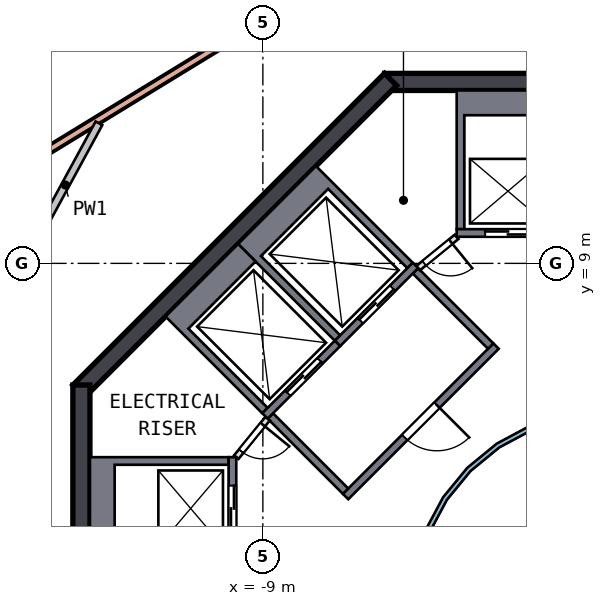
"""IFC4 building model, lengths in metres.
Left out: names, types, materials, properties, quantities, classifications, styles, units other than length and angle.
Written with IfcOpenShell. Run it as: python <this file> out.ifc"""

import sys

from ifc_helpers import new_model, si_unit, direction, frame, frame_2d, origin, place, context, subcontext, project, spatial, polyline, rectangle, outline, extrude, element, fill, save


model = new_model("IFC4")
c1 = context("Model", 3, precision=1e-05, world=origin(), true_north=direction((0.0, 1.0)))
c2 = subcontext(c1, "Body", "Model", "MODEL_VIEW")
j1 = project(units=[si_unit("LENGTHUNIT", "METRE"), si_unit("PLANEANGLEUNIT", "RADIAN")], contexts=[c1])
p1 = place(None, origin())
s1 = spatial("IfcSite", under=j1, at=p1, CompositionType="ELEMENT")
p2 = place(p1, origin())
s2 = spatial("IfcBuilding", under=s1, at=p2, CompositionType="ELEMENT")
p3 = place(p2, frame((0.0, 0.0, 284.5)))
s3 = spatial("IfcBuildingStorey", under=s2, at=p3, CompositionType="ELEMENT", Elevation=284.5)
p4 = place(p3, frame((5.799, 13.775, 0.0), z_axis=(0.0, 0.0, 1.0), x_axis=(-1.0, 0.0, 0.0)))
e1 = element("IfcWall", 1, at=p4, inside=s3, PredefinedType="SHEAR", context=c2, shape_type="SweptSolid", body=[
    extrude(rectangle(XDim=11.598, YDim=0.45, at=frame_2d((5.799, 0.0))), origin(), (0.0, 0.0, 1.0), 3.5),
])
p5 = place(p4, frame((4.899, 0.0, 0.0)))
e2 = element("IfcOpeningElement", 2, at=p5, cuts=e1, PredefinedType="OPENING", context=c2, shape_type="SweptSolid", body=[
    extrude(rectangle(XDim=1.8, YDim=2.1, at=frame_2d((0.9, 1.05))), frame((0.0, 0.235, 0.0), z_axis=(0.0, -1.0, 0.0), x_axis=(1.0, 0.0, 0.0)), (0.0, 0.0, 1.0), 0.47),
])
p6 = place(p3, frame((-5.64, 13.841, 0.0), z_axis=(0.0, 0.0, 1.0), x_axis=(-0.707106781, -0.707106781, 0.0)))
e3 = element("IfcWall", 3, at=p6, inside=s3, PredefinedType="SHEAR", context=c2, shape_type="SweptSolid", body=[
    extrude(rectangle(XDim=11.598, YDim=0.45, at=frame_2d((5.799, 0.0))), origin(), (0.0, 0.0, 1.0), 3.5),
])
p7 = place(p3, frame((-13.775, 5.799, 0.0), z_axis=(0.0, 0.0, 1.0), x_axis=(0.0, -1.0, 0.0)))
e4 = element("IfcWall", 4, at=p7, inside=s3, PredefinedType="SHEAR", context=c2, shape_type="SweptSolid", body=[
    extrude(rectangle(XDim=11.598, YDim=0.45, at=frame_2d((5.799, 0.0))), origin(), (0.0, 0.0, 1.0), 3.5),
])
p8 = place(p7, frame((4.899, 0.0, 0.0)))
e5 = element("IfcOpeningElement", 5, at=p8, cuts=e4, PredefinedType="OPENING", context=c2, shape_type="SweptSolid", body=[
    extrude(rectangle(XDim=1.8, YDim=2.1, at=frame_2d((0.9, 1.05))), frame((0.0, 0.235, 0.0), z_axis=(0.0, -1.0, 0.0), x_axis=(1.0, 0.0, 0.0)), (0.0, 0.0, 1.0), 0.47),
])
p9 = place(p3, frame((-14.861, 11.846, 0.0), z_axis=(0.0, 0.0, 1.0), x_axis=(0.853179687, 0.521617121, 0.0)))
e6 = element("IfcWall", 6, at=p9, inside=s3, PredefinedType="SOLIDWALL", context=c2, shape_type="SweptSolid", body=[
    extrude(rectangle(XDim=13.0, YDim=0.2, at=frame_2d((6.5, 0.0))), origin(), (0.0, 0.0, 1.0), 3.19),
])
p10 = place(p9, frame((5.6, 0.0, 0.0)))
e7 = element("IfcOpeningElement", 7, at=p10, cuts=e6, PredefinedType="OPENING", context=c2, shape_type="SweptSolid", body=[
    extrude(rectangle(XDim=1.8, YDim=2.4, at=frame_2d((0.9, 1.2))), frame((0.0, 0.11, 0.0), z_axis=(0.0, -1.0, 0.0), x_axis=(1.0, 0.0, 0.0)), (0.0, 0.0, 1.0), 0.22),
])
p11 = place(p3, origin())
e8 = element("IfcWall", 8, at=p11, inside=s3, PredefinedType="SOLIDWALL", context=c2, shape_type="SweptSolid", body=[
    extrude(outline(polyline([(-3.9, 13.55), (-1.2, 13.55), (-1.2, 9.9), (-1.4, 9.9), (-1.4, 12.9), (-3.7, 12.9), (-3.7, 9.9), (-3.9, 9.9), (-3.9, 13.55)])), origin(), (0.0, 0.0, 1.0), 3.19),
])
p12 = place(p3, frame((-1.2, 9.8, 0.0), z_axis=(0.0, 0.0, 1.0), x_axis=(-1.0, 0.0, 0.0)))
e9 = element("IfcWall", 9, at=p12, inside=s3, PredefinedType="SOLIDWALL", context=c2, shape_type="SweptSolid", body=[
    extrude(rectangle(XDim=2.7, YDim=0.2, at=frame_2d((1.35, 0.0))), origin(), (0.0, 0.0, 1.0), 3.19),
])
p13 = place(p12, frame((0.75, 0.0, 0.0)))
e10 = element("IfcOpeningElement", 10, at=p13, cuts=e9, PredefinedType="OPENING", context=c2, shape_type="SweptSolid", body=[
    extrude(rectangle(XDim=1.2, YDim=2.1, at=frame_2d((0.6, 1.05))), frame((0.0, 0.11, 0.0), z_axis=(0.0, -1.0, 0.0), x_axis=(1.0, 0.0, 0.0)), (0.0, 0.0, 1.0), 0.22),
])
p14 = place(p3, origin())
e11 = element("IfcWall", 11, at=p14, inside=s3, PredefinedType="SOLIDWALL", context=c2, shape_type="SweptSolid", body=[
    extrude(outline(polyline([(-13.55, 3.9), (-9.9, 3.9), (-9.9, 3.7), (-12.9, 3.7), (-12.9, 1.4), (-9.9, 1.4), (-9.9, 1.2), (-13.55, 1.2), (-13.55, 3.9)])), origin(), (0.0, 0.0, 1.0), 3.19),
])
p15 = place(p3, frame((-9.8, 1.2, 0.0), z_axis=(0.0, 0.0, 1.0), x_axis=(0.0, 1.0, 0.0)))
e12 = element("IfcWall", 12, at=p15, inside=s3, PredefinedType="SOLIDWALL", context=c2, shape_type="SweptSolid", body=[
    extrude(rectangle(XDim=2.7, YDim=0.2, at=frame_2d((1.35, 0.0))), origin(), (0.0, 0.0, 1.0), 3.19),
])
p16 = place(p15, frame((0.75, 0.0, 0.0)))
e13 = element("IfcOpeningElement", 13, at=p16, cuts=e12, PredefinedType="OPENING", context=c2, shape_type="SweptSolid", body=[
    extrude(rectangle(XDim=1.2, YDim=2.1, at=frame_2d((0.6, 1.05))), frame((0.0, 0.11, 0.0), z_axis=(0.0, -1.0, 0.0), x_axis=(1.0, 0.0, 0.0)), (0.0, 0.0, 1.0), 0.22),
])
p17 = place(p3, origin())
e14 = element("IfcWall", 14, at=p17, inside=s3, PredefinedType="SOLIDWALL", context=c2, shape_type="SweptSolid", body=[
    extrude(outline(polyline([(-9.652, 9.51), (-7.601, 11.561), (-5.056, 9.016), (-5.197, 8.874), (-7.283, 10.96), (-9.051, 9.192), (-6.965, 7.106), (-7.106, 6.965), (-9.652, 9.51)])), origin(), (0.0, 0.0, 1.0), 3.19),
])
p18 = place(p3, frame((-4.985, 8.945, 0.0), z_axis=(0.0, 0.0, 1.0), x_axis=(-0.707106781, -0.707106781, 0.0)))
e15 = element("IfcWall", 15, at=p18, inside=s3, PredefinedType="SOLIDWALL", context=c2, shape_type="SweptSolid", body=[
    extrude(rectangle(XDim=2.9, YDim=0.2, at=frame_2d((1.45, 0.0))), origin(), (0.0, 0.0, 1.0), 3.19),
])
p19 = place(p18, frame((0.85, 0.0, 0.0)))
e16 = element("IfcOpeningElement", 16, at=p19, cuts=e15, PredefinedType="OPENING", context=c2, shape_type="SweptSolid", body=[
    extrude(rectangle(XDim=1.2, YDim=2.1, at=frame_2d((0.6, 1.05))), frame((0.0, 0.11, 0.0), z_axis=(0.0, -1.0, 0.0), x_axis=(1.0, 0.0, 0.0)), (0.0, 0.0, 1.0), 0.22),
])
p20 = place(p3, origin())
e17 = element("IfcWall", 17, at=p20, inside=s3, PredefinedType="SOLIDWALL", context=c2, shape_type="SweptSolid", body=[
    extrude(outline(polyline([(-11.561, 7.601), (-9.652, 9.51), (-9.192, 9.051), (-10.96, 7.283), (-8.874, 5.197), (-9.016, 5.056), (-11.561, 7.601)])), origin(), (0.0, 0.0, 1.0), 3.19),
])
p21 = place(p3, frame((-7.036, 6.894, 0.0), z_axis=(0.0, 0.0, 1.0), x_axis=(-0.707106781, -0.707106781, 0.0)))
e18 = element("IfcWall", 18, at=p21, inside=s3, PredefinedType="SOLIDWALL", context=c2, shape_type="SweptSolid", body=[
    extrude(rectangle(XDim=2.7, YDim=0.2, at=frame_2d((1.35, 0.0))), origin(), (0.0, 0.0, 1.0), 3.19),
])
p22 = place(p21, frame((0.65, 0.0, 0.0)))
e19 = element("IfcOpeningElement", 19, at=p22, cuts=e18, PredefinedType="OPENING", context=c2, shape_type="SweptSolid", body=[
    extrude(rectangle(XDim=1.2, YDim=2.1, at=frame_2d((0.6, 1.05))), frame((0.0, 0.11, 0.0), z_axis=(0.0, -1.0, 0.0), x_axis=(1.0, 0.0, 0.0)), (0.0, 0.0, 1.0), 0.22),
])
p23 = place(p3, frame((-2.864, 6.823, 0.0), z_axis=(0.0, 0.0, 1.0), x_axis=(-0.707106781, -0.707106781, 0.0)))
e20 = element("IfcWall", 20, at=p23, inside=s3, PredefinedType="SOLIDWALL", context=c2, shape_type="SweptSolid", body=[
    extrude(rectangle(XDim=5.6, YDim=0.2, at=frame_2d((2.8, 0.0))), origin(), (0.0, 0.0, 1.0), 3.19),
])
p24 = place(p23, frame((2.2, 0.0, 0.0)))
e21 = element("IfcOpeningElement", 21, at=p24, cuts=e20, PredefinedType="OPENING", context=c2, shape_type="SweptSolid", body=[
    extrude(rectangle(XDim=1.2, YDim=2.1, at=frame_2d((0.6, 1.05))), frame((0.0, 0.11, 0.0), z_axis=(0.0, -1.0, 0.0), x_axis=(1.0, 0.0, 0.0)), (0.0, 0.0, 1.0), 0.22),
])
for number, where, z_axis, x_axis in (
    (22, (-3.005, 6.823, 0.0), (0.0, 0.0, 1.0), (-0.707, 0.707, 0.0)),
    (23, (-6.823, 3.005, 0.0), (0.0, 0.0, 1.0), (-0.707, 0.707, 0.0)),
):
    element("IfcWall", number, at=place(p3, frame(where, z_axis=z_axis, x_axis=x_axis)), inside=s3, PredefinedType="SOLIDWALL", context=c2, shape_type="SweptSolid", body=[
        extrude(rectangle(XDim=2.8, YDim=0.2, at=frame_2d((1.4, 0.0))), origin(), (0.0, 0.0, 1.0), 3.19),
    ])
p25 = place(p3, frame((-3.9, 9.7, 0.0), z_axis=(0.0, 0.0, 1.0), x_axis=(-0.775559878, -0.631274009, 0.0)))
e24 = element("IfcWall", 24, at=p25, inside=s3, PredefinedType="PARTITIONING", context=c2, shape_type="SweptSolid", body=[
    extrude(rectangle(XDim=1.308, YDim=0.15, at=frame_2d((0.654, 0.0))), origin(), (0.0, 0.0, 1.0), 3.19),
])
p26 = place(p25, frame((0.204, 0.0, 0.0)))
e25 = element("IfcOpeningElement", 25, at=p26, cuts=e24, PredefinedType="OPENING", context=c2, shape_type="SweptSolid", body=[
    extrude(rectangle(XDim=0.9, YDim=2.1, at=frame_2d((0.45, 1.05))), frame((0.0, 0.085, 0.0), z_axis=(0.0, -1.0, 0.0), x_axis=(1.0, 0.0, 0.0)), (0.0, 0.0, 1.0), 0.17),
])
p27 = place(p3, frame((-8.874, 4.914, 0.0), z_axis=(0.0, 0.0, 1.0), x_axis=(-0.631274009, -0.775559878, 0.0)))
e26 = element("IfcWall", 26, at=p27, inside=s3, PredefinedType="PARTITIONING", context=c2, shape_type="SweptSolid", body=[
    extrude(rectangle(XDim=1.308, YDim=0.15, at=frame_2d((0.654, 0.0))), origin(), (0.0, 0.0, 1.0), 3.19),
])
p28 = place(p27, frame((0.204, 0.0, 0.0)))
e27 = element("IfcOpeningElement", 27, at=p28, cuts=e26, PredefinedType="OPENING", context=c2, shape_type="SweptSolid", body=[
    extrude(rectangle(XDim=0.9, YDim=2.1, at=frame_2d((0.45, 1.05))), frame((0.0, 0.085, 0.0), z_axis=(0.0, -1.0, 0.0), x_axis=(1.0, 0.0, 0.0)), (0.0, 0.0, 1.0), 0.17),
])
p29 = place(p3, origin())
e28 = element("IfcWall", 28, at=p29, inside=s3, PredefinedType="SOLIDWALL", context=c2, shape_type="SweptSolid", body=[
    extrude(outline(polyline([(5.021, -0.999), (4.73, -1.959), (4.257, -2.844), (3.62, -3.62), (2.844, -4.257), (1.959, -4.73), (0.999, -5.021), (0.0, -5.12), (-0.999, -5.021), (-1.959, -4.73), (-2.844, -4.257), (-3.62, -3.62), (-4.257, -2.844), (-4.73, -1.959), (-5.021, -0.999), (-5.12, 0.0), (-5.021, 0.999), (-4.73, 1.959), (-4.257, 2.844), (-3.62, 3.62), (-2.844, 4.257), (-1.959, 4.73), (-0.999, 5.021), (0.0, 5.12), (0.999, 5.021), (1.959, 4.73), (2.844, 4.257), (3.62, 3.62), (4.257, 2.844), (4.73, 1.959), (5.021, 0.999), (5.12, 0.0), (5.021, -0.999)]), holes=[polyline([(4.904, 0.976), (4.619, 1.913), (4.157, 2.778), (3.535, 3.535), (2.778, 4.157), (1.913, 4.619), (0.976, 4.904), (0.0, 5.0), (-0.976, 4.904), (-1.913, 4.619), (-2.778, 4.157), (-3.535, 3.535), (-4.157, 2.778), (-4.619, 1.913), (-4.904, 0.976), (-5.0, 0.0), (-4.904, -0.976), (-4.619, -1.913), (-4.157, -2.778), (-3.535, -3.535), (-2.778, -4.157), (-1.913, -4.619), (-0.976, -4.904), (0.0, -5.0), (0.976, -4.904), (1.913, -4.619), (2.778, -4.157), (3.535, -3.535), (4.157, -2.778), (4.619, -1.913), (4.904, -0.976), (5.0, 0.0), (4.904, 0.976)])]), origin(), (0.0, 0.0, 1.0), 3.19),
])
p30 = place(p3, frame((-17.872, 4.311, 0.0), z_axis=(0.0, 0.0, 1.0), x_axis=(0.478082475, 0.878314947, 0.0)))
e29 = element("IfcWall", 29, at=p30, inside=s3, PredefinedType="SOLIDWALL", context=c2, shape_type="SweptSolid", body=[
    extrude(rectangle(XDim=9.537, YDim=0.2, at=frame_2d((4.768, 0.0))), origin(), (0.0, 0.0, 1.0), 3.19),
])
p31 = place(p30, frame((3.838, 0.0, 0.0)))
e30 = element("IfcOpeningElement", 30, at=p31, cuts=e29, PredefinedType="OPENING", context=c2, shape_type="SweptSolid", body=[
    extrude(rectangle(XDim=1.8, YDim=2.1, at=frame_2d((0.9, 1.05))), frame((0.0, 0.11, 0.0), z_axis=(0.0, -1.0, 0.0), x_axis=(1.0, 0.0, 0.0)), (0.0, 0.0, 1.0), 0.22),
])
p32 = place(p13, origin())
e31 = element("IfcDoor", 31, at=p32, inside=s3, OperationType="DOUBLE_DOOR_SLIDING", PredefinedType="DOOR", context=c2, shape_type="SweptSolid", body=[
    extrude(rectangle(XDim=1.2, YDim=2.1, at=frame_2d((0.6, 1.05))), frame((0.0, 0.025, 0.0), z_axis=(0.0, -1.0, 0.0), x_axis=(1.0, 0.0, 0.0)), (0.0, 0.0, 1.0), 0.05),
])
fill(e10, e31)
p33 = place(p16, origin())
e32 = element("IfcDoor", 32, at=p33, inside=s3, OperationType="DOUBLE_DOOR_SLIDING", PredefinedType="DOOR", context=c2, shape_type="SweptSolid", body=[
    extrude(rectangle(XDim=1.2, YDim=2.1, at=frame_2d((0.6, 1.05))), frame((0.0, 0.025, 0.0), z_axis=(0.0, -1.0, 0.0), x_axis=(1.0, 0.0, 0.0)), (0.0, 0.0, 1.0), 0.05),
])
fill(e13, e32)
p34 = place(p19, origin())
e33 = element("IfcDoor", 33, at=p34, inside=s3, OperationType="DOUBLE_DOOR_SLIDING", PredefinedType="DOOR", context=c2, shape_type="SweptSolid", body=[
    extrude(rectangle(XDim=1.2, YDim=2.1, at=frame_2d((0.6, 1.05))), frame((0.0, 0.025, 0.0), z_axis=(0.0, -1.0, 0.0), x_axis=(1.0, 0.0, 0.0)), (0.0, 0.0, 1.0), 0.05),
])
fill(e16, e33)
p35 = place(p22, origin())
e34 = element("IfcDoor", 34, at=p35, inside=s3, OperationType="DOUBLE_DOOR_SLIDING", PredefinedType="DOOR", context=c2, shape_type="SweptSolid", body=[
    extrude(rectangle(XDim=1.2, YDim=2.1, at=frame_2d((0.6, 1.05))), frame((0.0, 0.025, 0.0), z_axis=(0.0, -1.0, 0.0), x_axis=(1.0, 0.0, 0.0)), (0.0, 0.0, 1.0), 0.05),
])
fill(e19, e34)
p36 = place(p24, origin())
e35 = element("IfcDoor", 35, at=p36, inside=s3, OperationType="SINGLE_SWING_LEFT", PredefinedType="DOOR", context=c2, shape_type="SweptSolid", body=[
    extrude(rectangle(XDim=1.2, YDim=2.1, at=frame_2d((0.6, 1.05))), frame((0.0, 0.025, 0.0), z_axis=(0.0, -1.0, 0.0), x_axis=(1.0, 0.0, 0.0)), (0.0, 0.0, 1.0), 0.05),
])
fill(e21, e35)
p37 = place(p26, origin())
e36 = element("IfcDoor", 36, at=p37, inside=s3, OperationType="SINGLE_SWING_LEFT", PredefinedType="DOOR", context=c2, shape_type="SweptSolid", body=[
    extrude(rectangle(XDim=0.9, YDim=2.1, at=frame_2d((0.45, 1.05))), frame((0.0, 0.025, 0.0), z_axis=(0.0, -1.0, 0.0), x_axis=(1.0, 0.0, 0.0)), (0.0, 0.0, 1.0), 0.05),
])
fill(e25, e36)
p38 = place(p28, origin())
e37 = element("IfcDoor", 37, at=p38, inside=s3, OperationType="SINGLE_SWING_LEFT", PredefinedType="DOOR", context=c2, shape_type="SweptSolid", body=[
    extrude(rectangle(XDim=0.9, YDim=2.1, at=frame_2d((0.45, 1.05))), frame((0.0, 0.025, 0.0), z_axis=(0.0, -1.0, 0.0), x_axis=(1.0, 0.0, 0.0)), (0.0, 0.0, 1.0), 0.05),
])
fill(e27, e37)
save(model, sys.argv[1])
